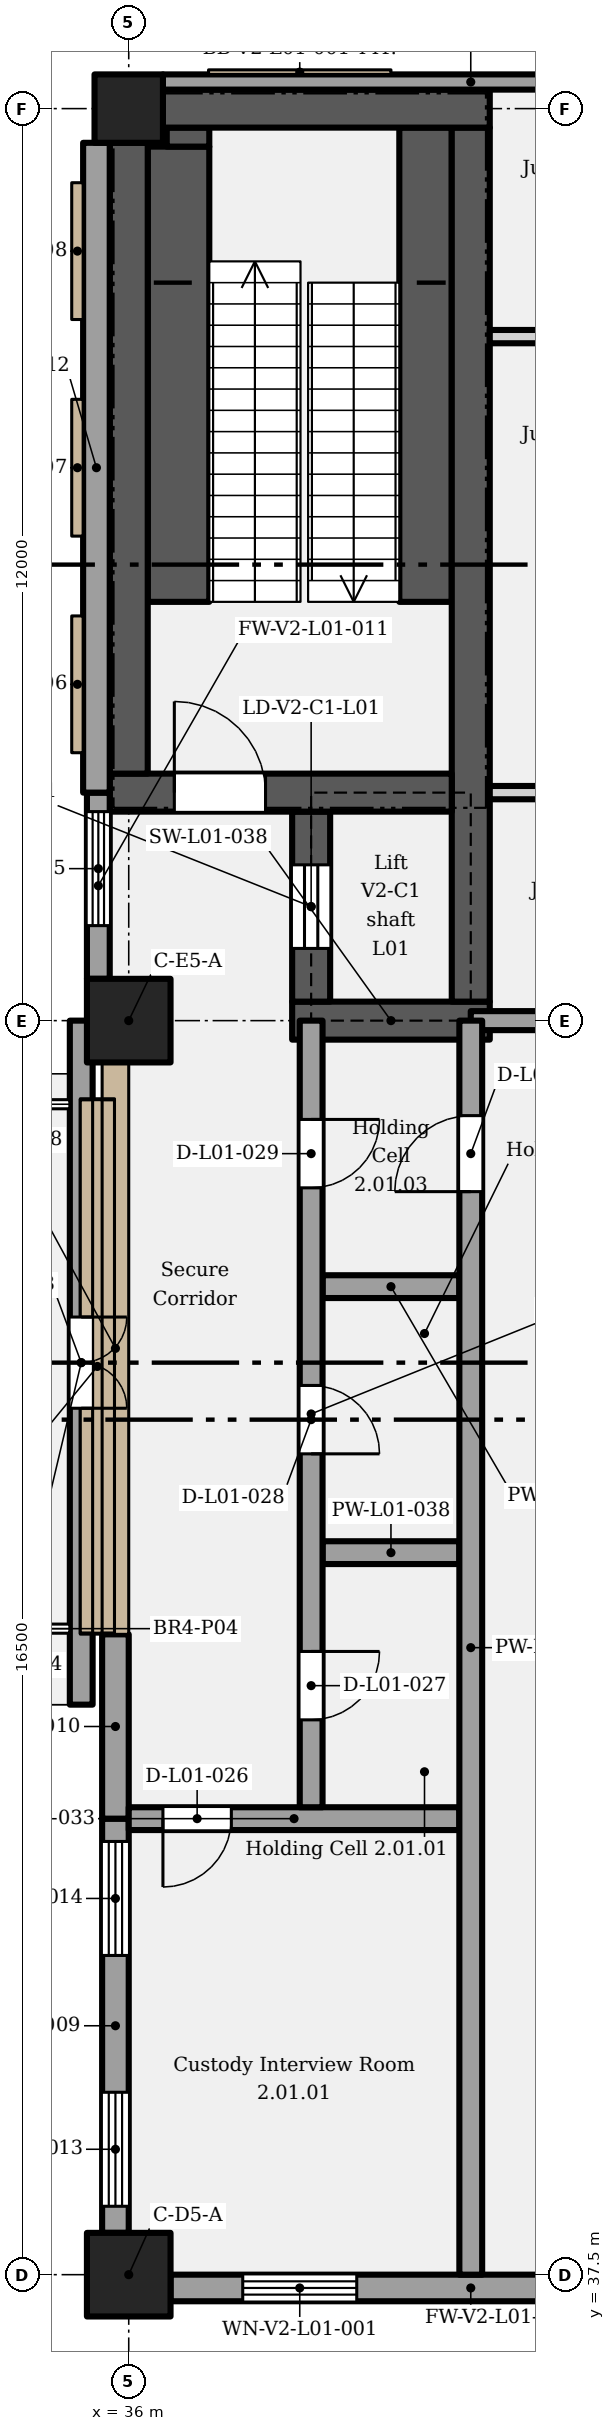
"""IFC4 building model, lengths in metres.
Left out: names, types, materials, properties, quantities, classifications, styles, units other than length and angle.
Written with IfcOpenShell. Run it as: python <this file> out.ifc"""

import sys

from ifc_helpers import new_model, si_unit, direction, frame, frame_2d, origin, origin_2d, place, context, subcontext, project, spatial, rectangle, extrude, element, fill, save


model = new_model("IFC4")
c1 = context("Model", 3, precision=1e-05, world=origin(), true_north=direction((0.0, 1.0)))
c2 = subcontext(c1, "Body", "Model", "MODEL_VIEW")
j1 = project(units=[si_unit("LENGTHUNIT", "METRE"), si_unit("PLANEANGLEUNIT", "RADIAN")], contexts=[c1])
p1 = place(None, origin())
s1 = spatial("IfcSite", under=j1, at=p1, CompositionType="ELEMENT")
p2 = place(p1, origin())
s2 = spatial("IfcBuilding", under=s1, at=p2, CompositionType="ELEMENT")
p3 = place(p2, frame((0.0, 0.0, 6.6)))
s3 = spatial("IfcBuildingStorey", under=s2, at=p3, CompositionType="ELEMENT", Elevation=6.6)
for number, where, z_axis, x_axis in (
    (1, (36.0, 37.5, 0.0), (0.0, 0.0, 1.0), (1.0, 0.0, 0.0)),
    (2, (36.0, 54.0, 0.0), (0.0, 0.0, 1.0), (1.0, 0.0, 0.0)),
):
    element("IfcColumn", number, at=place(p3, frame(where, z_axis=z_axis, x_axis=x_axis)), inside=s3, PredefinedType="COLUMN", context=c2, shape_type="SweptSolid", body=[
        extrude(rectangle(XDim=1.1, YDim=1.1, at=origin_2d()), origin(), (0.0, 0.0, 1.0), 5.4),
    ])
p4 = place(p3, frame((36.0, 66.0, 0.0), z_axis=(0.0, 0.0, 1.0), x_axis=(1.0, 0.0, 0.0)))
e3 = element("IfcColumn", 3, at=p4, inside=s3, PredefinedType="COLUMN", context=c2, shape_type="SweptSolid", body=[
    extrude(rectangle(XDim=0.9, YDim=0.9, at=origin_2d()), origin(), (0.0, 0.0, 1.0), 5.4),
])
p5 = place(p3, frame((38.15, 54.0, 0.0), z_axis=(0.0, 0.0, 1.0), x_axis=(1.0, 0.0, 0.0)))
e4 = element("IfcWall", 4, at=p5, inside=s3, PredefinedType="SHEAR", context=c2, shape_type="SweptSolid", body=[
    extrude(rectangle(XDim=2.6, YDim=0.5, at=frame_2d((1.3, 0.0))), origin(), (0.0, 0.0, 1.0), 5.1),
])
p6 = place(p3, frame((38.4, 54.25, 0.0), z_axis=(0.0, 0.0, 1.0), x_axis=(0.0, 1.0, 0.0)))
e5 = element("IfcWall", 5, at=p6, inside=s3, PredefinedType="SHEAR", context=c2, shape_type="SweptSolid", body=[
    extrude(rectangle(XDim=2.5, YDim=0.5, at=frame_2d((1.25, 0.0))), origin(), (0.0, 0.0, 1.0), 5.1),
])
p7 = place(p6, frame((0.7, 0.0, 0.0)))
e6 = element("IfcOpeningElement", 6, at=p7, cuts=e5, PredefinedType="OPENING", context=c2, shape_type="SweptSolid", body=[
    extrude(rectangle(XDim=1.1, YDim=2.1, at=frame_2d((0.55, 1.05))), frame((0.0, 0.26, 0.0), z_axis=(0.0, -1.0, 0.0), x_axis=(1.0, 0.0, 0.0)), (0.0, 0.0, 1.0), 0.52),
])
p8 = place(p3, frame((40.5, 54.25, 0.0), z_axis=(0.0, 0.0, 1.0), x_axis=(0.0, 1.0, 0.0)))
e7 = element("IfcWall", 7, at=p8, inside=s3, PredefinedType="SHEAR", context=c2, shape_type="SweptSolid", body=[
    extrude(rectangle(XDim=11.5, YDim=0.5, at=frame_2d((5.75, 0.0))), origin(), (0.0, 0.0, 1.0), 5.1),
])
p9 = place(p3, frame((35.75, 57.0, 0.0), z_axis=(0.0, 0.0, 1.0), x_axis=(1.0, 0.0, 0.0)))
e8 = element("IfcWall", 8, at=p9, inside=s3, PredefinedType="SHEAR", context=c2, shape_type="SweptSolid", body=[
    extrude(rectangle(XDim=4.5, YDim=0.5, at=frame_2d((2.25, 0.0))), origin(), (0.0, 0.0, 1.0), 5.1),
])
p10 = place(p9, frame((0.85, 0.0, 0.0)))
e9 = element("IfcOpeningElement", 9, at=p10, cuts=e8, PredefinedType="OPENING", context=c2, shape_type="SweptSolid", body=[
    extrude(rectangle(XDim=1.2, YDim=2.1, at=frame_2d((0.6, 1.05))), frame((0.0, 0.26, 0.0), z_axis=(0.0, -1.0, 0.0), x_axis=(1.0, 0.0, 0.0)), (0.0, 0.0, 1.0), 0.52),
])
p11 = place(p3, frame((36.0, 57.25, 0.0), z_axis=(0.0, 0.0, 1.0), x_axis=(0.0, 1.0, 0.0)))
e10 = element("IfcWall", 10, at=p11, inside=s3, PredefinedType="SHEAR", context=c2, shape_type="SweptSolid", body=[
    extrude(rectangle(XDim=8.3, YDim=0.5, at=frame_2d((4.15, 0.0))), origin(), (0.0, 0.0, 1.0), 5.1),
])
p12 = place(p3, frame((36.45, 66.0, 0.0), z_axis=(0.0, 0.0, 1.0), x_axis=(1.0, 0.0, 0.0)))
e11 = element("IfcWall", 11, at=p12, inside=s3, PredefinedType="SHEAR", context=c2, shape_type="SweptSolid", body=[
    extrude(rectangle(XDim=4.3, YDim=0.5, at=frame_2d((2.15, 0.0))), origin(), (0.0, 0.0, 1.0), 5.1),
])
p13 = place(p3, frame((36.55, 37.325, 0.0), z_axis=(0.0, 0.0, 1.0), x_axis=(1.0, 0.0, 0.0)))
e12 = element("IfcWall", 12, at=p13, inside=s3, PredefinedType="SOLIDWALL", context=c2, shape_type="SweptSolid", body=[
    extrude(rectangle(XDim=7.9, YDim=0.35, at=frame_2d((3.95, 0.0))), origin(), (0.0, 0.0, 1.0), 5.4),
])
p14 = place(p13, frame((0.95, 0.0, 1.05)))
e13 = element("IfcOpeningElement", 13, at=p14, cuts=e12, PredefinedType="OPENING", context=c2, shape_type="SweptSolid", body=[
    extrude(rectangle(XDim=1.5, YDim=3.75, at=frame_2d((0.75, 1.875))), frame((0.0, 0.185, 0.0), z_axis=(0.0, -1.0, 0.0), x_axis=(1.0, 0.0, 0.0)), (0.0, 0.0, 1.0), 0.37),
])
p15 = place(p13, frame((5.45, 0.0, 1.05)))
e14 = element("IfcOpeningElement", 14, at=p15, cuts=e12, PredefinedType="OPENING", context=c2, shape_type="SweptSolid", body=[
    extrude(rectangle(XDim=1.5, YDim=3.75, at=frame_2d((0.75, 1.875))), frame((0.0, 0.185, 0.0), z_axis=(0.0, -1.0, 0.0), x_axis=(1.0, 0.0, 0.0)), (0.0, 0.0, 1.0), 0.37),
])
p16 = place(p3, frame((36.45, 66.35, 0.0), z_axis=(0.0, 0.0, 1.0), x_axis=(1.0, 0.0, 0.0)))
e15 = element("IfcWall", 15, at=p16, inside=s3, PredefinedType="SOLIDWALL", context=c2, shape_type="SweptSolid", body=[
    extrude(rectangle(XDim=8.1, YDim=0.2, at=frame_2d((4.05, 0.0))), origin(), (0.0, 0.0, 1.0), 5.1),
])
p17 = place(p16, frame((6.525, 0.0, 1.05)))
e16 = element("IfcOpeningElement", 16, at=p17, cuts=e15, PredefinedType="OPENING", context=c2, shape_type="SweptSolid", body=[
    extrude(rectangle(XDim=1.05, YDim=2.4, at=frame_2d((0.525, 1.2))), frame((0.0, 0.11, 0.0), z_axis=(0.0, -1.0, 0.0), x_axis=(1.0, 0.0, 0.0)), (0.0, 0.0, 1.0), 0.22),
])
p18 = place(p3, frame((35.825, 38.05, 0.0), z_axis=(0.0, 0.0, 1.0), x_axis=(0.0, 1.0, 0.0)))
e17 = element("IfcWall", 17, at=p18, inside=s3, PredefinedType="SOLIDWALL", context=c2, shape_type="SweptSolid", body=[
    extrude(rectangle(XDim=5.45, YDim=0.35, at=frame_2d((2.725, 0.0))), origin(), (0.0, 0.0, 1.0), 5.1),
])
p19 = place(p18, frame((0.35, 0.0, 1.05)))
e18 = element("IfcOpeningElement", 18, at=p19, cuts=e17, PredefinedType="OPENING", context=c2, shape_type="SweptSolid", body=[
    extrude(rectangle(XDim=1.5, YDim=3.45, at=frame_2d((0.75, 1.725))), frame((0.0, 0.185, 0.0), z_axis=(0.0, -1.0, 0.0), x_axis=(1.0, 0.0, 0.0)), (0.0, 0.0, 1.0), 0.37),
])
p20 = place(p18, frame((3.65, 0.0, 1.05)))
e19 = element("IfcOpeningElement", 19, at=p20, cuts=e17, PredefinedType="OPENING", context=c2, shape_type="SweptSolid", body=[
    extrude(rectangle(XDim=1.5, YDim=3.45, at=frame_2d((0.75, 1.725))), frame((0.0, 0.185, 0.0), z_axis=(0.0, -1.0, 0.0), x_axis=(1.0, 0.0, 0.0)), (0.0, 0.0, 1.0), 0.37),
])
p21 = place(p3, frame((35.825, 43.5, 0.0), z_axis=(0.0, 0.0, 1.0), x_axis=(0.0, 1.0, 0.0)))
e20 = element("IfcWall", 20, at=p21, inside=s3, PredefinedType="SOLIDWALL", context=c2, shape_type="SweptSolid", body=[
    extrude(rectangle(XDim=2.425, YDim=0.35, at=frame_2d((1.212, 0.0))), origin(), (0.0, 0.0, 1.0), 5.1),
])
p22 = place(p3, frame((35.6, 54.55, 0.0), z_axis=(0.0, 0.0, 1.0), x_axis=(0.0, 1.0, 0.0)))
e21 = element("IfcWall", 21, at=p22, inside=s3, PredefinedType="SOLIDWALL", context=c2, shape_type="SweptSolid", body=[
    extrude(rectangle(XDim=2.45, YDim=0.3, at=frame_2d((1.225, 0.0))), origin(), (0.0, 0.0, 1.0), 5.1),
])
p23 = place(p22, frame((0.7, 0.0, 1.05)))
e22 = element("IfcOpeningElement", 22, at=p23, cuts=e21, PredefinedType="OPENING", context=c2, shape_type="SweptSolid", body=[
    extrude(rectangle(XDim=1.5, YDim=3.45, at=frame_2d((0.75, 1.725))), frame((0.0, 0.16, 0.0), z_axis=(0.0, -1.0, 0.0), x_axis=(1.0, 0.0, 0.0)), (0.0, 0.0, 1.0), 0.32),
])
p24 = place(p3, frame((35.575, 57.0, 0.0), z_axis=(0.0, 0.0, 1.0), x_axis=(0.0, 1.0, 0.0)))
e23 = element("IfcWall", 23, at=p24, inside=s3, PredefinedType="SOLIDWALL", context=c2, shape_type="SweptSolid", body=[
    extrude(rectangle(XDim=8.55, YDim=0.35, at=frame_2d((4.275, 0.0))), origin(), (0.0, 0.0, 1.0), 5.1),
])
p25 = place(p3, frame((36.0, 43.5, 0.0), z_axis=(0.0, 0.0, 1.0), x_axis=(1.0, 0.0, 0.0)))
e24 = element("IfcWall", 24, at=p25, inside=s3, PredefinedType="PARTITIONING", context=c2, shape_type="SweptSolid", body=[
    extrude(rectangle(XDim=4.35, YDim=0.3, at=frame_2d((2.175, 0.0))), origin(), (0.0, 0.0, 1.0), 5.1),
])
p26 = place(p25, frame((1.35, 0.0, 0.0), z_axis=(0.0, 0.0, 1.0), x_axis=(-1.0, 0.0, 0.0)))
e25 = element("IfcOpeningElement", 25, at=p26, cuts=e24, PredefinedType="OPENING", context=c2, shape_type="SweptSolid", body=[
    extrude(rectangle(XDim=0.9, YDim=2.1, at=frame_2d((0.45, 1.05))), frame((0.0, 0.16, 0.0), z_axis=(0.0, -1.0, 0.0), x_axis=(1.0, 0.0, 0.0)), (0.0, 0.0, 1.0), 0.32),
])
for number, where, z_axis, x_axis in (
    (26, (38.55, 47.0, 0.0), (0.0, 0.0, 1.0), (1.0, 0.0, 0.0)),
    (27, (38.55, 50.5, 0.0), (0.0, 0.0, 1.0), (1.0, 0.0, 0.0)),
):
    element("IfcWall", number, at=place(p3, frame(where, z_axis=z_axis, x_axis=x_axis)), inside=s3, PredefinedType="PARTITIONING", context=c2, shape_type="SweptSolid", body=[
        extrude(rectangle(XDim=1.8, YDim=0.3, at=frame_2d((0.9, 0.0))), origin(), (0.0, 0.0, 1.0), 5.1),
    ])
p27 = place(p3, frame((40.5, 54.0, 0.0), z_axis=(0.0, 0.0, 1.0), x_axis=(1.0, 0.0, 0.0)))
e28 = element("IfcWall", 28, at=p27, inside=s3, PredefinedType="PARTITIONING", context=c2, shape_type="SweptSolid", body=[
    extrude(rectangle(XDim=3.95, YDim=0.25, at=frame_2d((1.975, 0.0))), origin(), (0.0, 0.0, 1.0), 4.35),
])
p28 = place(p27, frame((1.3, 0.0, 0.0)))
e29 = element("IfcOpeningElement", 29, at=p28, cuts=e28, PredefinedType="OPENING", context=c2, shape_type="SweptSolid", body=[
    extrude(rectangle(XDim=1.0, YDim=2.1, at=frame_2d((0.5, 1.05))), frame((0.0, 0.135, 0.0), z_axis=(0.0, -1.0, 0.0), x_axis=(1.0, 0.0, 0.0)), (0.0, 0.0, 1.0), 0.27),
])
p29 = place(p3, frame((40.75, 57.0, 0.0), z_axis=(0.0, 0.0, 1.0), x_axis=(1.0, 0.0, 0.0)))
e30 = element("IfcWall", 30, at=p29, inside=s3, PredefinedType="PARTITIONING", context=c2, shape_type="SweptSolid", body=[
    extrude(rectangle(XDim=3.275, YDim=0.175, at=frame_2d((1.637, 0.0))), origin(), (0.0, 0.0, 1.0), 5.1),
])
p30 = place(p29, frame((2.0, 0.0, 0.0), z_axis=(0.0, 0.0, 1.0), x_axis=(-1.0, 0.0, 0.0)))
e31 = element("IfcOpeningElement", 31, at=p30, cuts=e30, PredefinedType="OPENING", context=c2, shape_type="SweptSolid", body=[
    extrude(rectangle(XDim=0.9, YDim=2.1, at=frame_2d((0.45, 1.05))), frame((0.0, 0.097, 0.0), z_axis=(0.0, -1.0, 0.0), x_axis=(1.0, 0.0, 0.0)), (0.0, 0.0, 1.0), 0.195),
])
p31 = place(p3, frame((40.75, 63.0, 0.0), z_axis=(0.0, 0.0, 1.0), x_axis=(1.0, 0.0, 0.0)))
e32 = element("IfcWall", 32, at=p31, inside=s3, PredefinedType="PARTITIONING", context=c2, shape_type="SweptSolid", body=[
    extrude(rectangle(XDim=3.35, YDim=0.175, at=frame_2d((1.675, 0.0))), origin(), (0.0, 0.0, 1.0), 5.1),
])
p32 = place(p3, frame((35.375, 45.0, 0.0), z_axis=(0.0, 0.0, 1.0), x_axis=(0.0, 1.0, 0.0)))
e33 = element("IfcWall", 33, at=p32, inside=s3, PredefinedType="PARTITIONING", context=c2, shape_type="SweptSolid", body=[
    extrude(rectangle(XDim=9.0, YDim=0.3, at=frame_2d((4.5, 0.0))), origin(), (0.0, 0.0, 1.0), 3.3),
])
p33 = place(p32, frame((5.1, 0.0, 0.0), z_axis=(0.0, 0.0, 1.0), x_axis=(-1.0, 0.0, 0.0)))
e34 = element("IfcOpeningElement", 34, at=p33, cuts=e33, PredefinedType="OPENING", context=c2, shape_type="SweptSolid", body=[
    extrude(rectangle(XDim=1.2, YDim=2.4, at=frame_2d((0.6, 1.2))), frame((0.0, 0.16, 0.0), z_axis=(0.0, -1.0, 0.0), x_axis=(1.0, 0.0, 0.0)), (0.0, 0.0, 1.0), 0.32),
])
p34 = place(p3, frame((38.4, 43.65, 0.0), z_axis=(0.0, 0.0, 1.0), x_axis=(0.0, 1.0, 0.0)))
e35 = element("IfcWall", 35, at=p34, inside=s3, PredefinedType="PARTITIONING", context=c2, shape_type="SweptSolid", body=[
    extrude(rectangle(XDim=10.35, YDim=0.3, at=frame_2d((5.175, 0.0))), origin(), (0.0, 0.0, 1.0), 5.1),
])
p35 = place(p34, frame((2.05, 0.0, 0.0), z_axis=(0.0, 0.0, 1.0), x_axis=(-1.0, 0.0, 0.0)))
e36 = element("IfcOpeningElement", 36, at=p35, cuts=e35, PredefinedType="OPENING", context=c2, shape_type="SweptSolid", body=[
    extrude(rectangle(XDim=0.9, YDim=2.0, at=frame_2d((0.45, 1.0))), frame((0.0, 0.16, 0.0), z_axis=(0.0, -1.0, 0.0), x_axis=(1.0, 0.0, 0.0)), (0.0, 0.0, 1.0), 0.32),
])
p36 = place(p34, frame((5.55, 0.0, 0.0), z_axis=(0.0, 0.0, 1.0), x_axis=(-1.0, 0.0, 0.0)))
e37 = element("IfcOpeningElement", 37, at=p36, cuts=e35, PredefinedType="OPENING", context=c2, shape_type="SweptSolid", body=[
    extrude(rectangle(XDim=0.9, YDim=2.0, at=frame_2d((0.45, 1.0))), frame((0.0, 0.16, 0.0), z_axis=(0.0, -1.0, 0.0), x_axis=(1.0, 0.0, 0.0)), (0.0, 0.0, 1.0), 0.32),
])
p37 = place(p34, frame((9.05, 0.0, 0.0), z_axis=(0.0, 0.0, 1.0), x_axis=(-1.0, 0.0, 0.0)))
e38 = element("IfcOpeningElement", 38, at=p37, cuts=e35, PredefinedType="OPENING", context=c2, shape_type="SweptSolid", body=[
    extrude(rectangle(XDim=0.9, YDim=2.0, at=frame_2d((0.45, 1.0))), frame((0.0, 0.16, 0.0), z_axis=(0.0, -1.0, 0.0), x_axis=(1.0, 0.0, 0.0)), (0.0, 0.0, 1.0), 0.32),
])
p38 = place(p3, frame((40.5, 37.5, 0.0), z_axis=(0.0, 0.0, 1.0), x_axis=(0.0, 1.0, 0.0)))
e39 = element("IfcWall", 39, at=p38, inside=s3, PredefinedType="PARTITIONING", context=c2, shape_type="SweptSolid", body=[
    extrude(rectangle(XDim=16.5, YDim=0.3, at=frame_2d((8.25, 0.0))), origin(), (0.0, 0.0, 1.0), 3.95),
])
p39 = place(p38, frame((14.25, 0.0, 0.0)))
e40 = element("IfcOpeningElement", 40, at=p39, cuts=e39, PredefinedType="OPENING", context=c2, shape_type="SweptSolid", body=[
    extrude(rectangle(XDim=1.0, YDim=2.0, at=frame_2d((0.5, 1.0))), frame((0.0, 0.16, 0.0), z_axis=(0.0, -1.0, 0.0), x_axis=(1.0, 0.0, 0.0)), (0.0, 0.0, 1.0), 0.32),
])
p40 = place(p3, frame((36.655, 59.51, 0.0), z_axis=(0.0, 0.0, 1.0), x_axis=(0.0, 1.0, 0.0)))
e41 = element("IfcWall", 41, at=p40, inside=s3, PredefinedType="SHEAR", context=c2, shape_type="SweptSolid", body=[
    extrude(rectangle(XDim=5.99, YDim=0.81, at=frame_2d((2.995, 0.0))), origin(), (0.0, 0.0, 1.0), 2.587),
])
p41 = place(p3, frame((36.78, 65.5, 0.0), z_axis=(0.0, 0.0, 1.0), x_axis=(0.0, 1.0, 0.0)))
e42 = element("IfcWall", 42, at=p41, inside=s3, PredefinedType="SHEAR", context=c2, shape_type="SweptSolid", body=[
    extrude(rectangle(XDim=0.25, YDim=0.56, at=frame_2d((0.125, 0.0))), origin(), (0.0, 0.0, 1.0), 2.587),
])
p42 = place(p3, frame((39.905, 59.51, 0.0), z_axis=(0.0, 0.0, 1.0), x_axis=(0.0, 1.0, 0.0)))
e43 = element("IfcWall", 43, at=p42, inside=s3, PredefinedType="SHEAR", context=c2, shape_type="SweptSolid", body=[
    extrude(rectangle(XDim=6.24, YDim=0.69, at=frame_2d((3.12, 0.0))), origin(), (0.0, 0.0, 1.0), 2.587),
])
p43 = place(p14, origin())
e44 = element("IfcWindow", 44, at=p43, inside=s3, PartitioningType="SINGLE_PANEL", PredefinedType="WINDOW", context=c2, shape_type="SweptSolid", body=[
    extrude(rectangle(XDim=1.5, YDim=3.75, at=frame_2d((0.75, 1.875))), frame((0.0, 0.03, 0.0), z_axis=(0.0, -1.0, 0.0), x_axis=(1.0, 0.0, 0.0)), (0.0, 0.0, 1.0), 0.06),
])
fill(e13, e44)
p44 = place(p19, origin())
e45 = element("IfcWindow", 45, at=p44, inside=s3, PartitioningType="SINGLE_PANEL", PredefinedType="WINDOW", context=c2, shape_type="SweptSolid", body=[
    extrude(rectangle(XDim=1.5, YDim=3.45, at=frame_2d((0.75, 1.725))), frame((0.0, 0.03, 0.0), z_axis=(0.0, -1.0, 0.0), x_axis=(1.0, 0.0, 0.0)), (0.0, 0.0, 1.0), 0.06),
])
fill(e18, e45)
p45 = place(p20, origin())
e46 = element("IfcWindow", 46, at=p45, inside=s3, PartitioningType="SINGLE_PANEL", PredefinedType="WINDOW", context=c2, shape_type="SweptSolid", body=[
    extrude(rectangle(XDim=1.5, YDim=3.45, at=frame_2d((0.75, 1.725))), frame((0.0, 0.03, 0.0), z_axis=(0.0, -1.0, 0.0), x_axis=(1.0, 0.0, 0.0)), (0.0, 0.0, 1.0), 0.06),
])
fill(e19, e46)
p46 = place(p23, origin())
e47 = element("IfcWindow", 47, at=p46, inside=s3, PartitioningType="SINGLE_PANEL", PredefinedType="WINDOW", context=c2, shape_type="SweptSolid", body=[
    extrude(rectangle(XDim=1.5, YDim=3.45, at=frame_2d((0.75, 1.725))), frame((0.0, 0.03, 0.0), z_axis=(0.0, -1.0, 0.0), x_axis=(1.0, 0.0, 0.0)), (0.0, 0.0, 1.0), 0.06),
])
fill(e22, e47)
p47 = place(p33, origin())
e48 = element("IfcDoor", 48, at=p47, inside=s3, OperationType="DOUBLE_DOOR_SINGLE_SWING", PredefinedType="DOOR", context=c2, shape_type="SweptSolid", body=[
    extrude(rectangle(XDim=1.2, YDim=2.4, at=frame_2d((0.6, 1.2))), frame((0.0, 0.025, 0.0), z_axis=(0.0, -1.0, 0.0), x_axis=(1.0, 0.0, 0.0)), (0.0, 0.0, 1.0), 0.05),
])
fill(e34, e48)
p48 = place(p7, origin())
e49 = element("IfcDoor", 49, at=p48, inside=s3, OperationType="SLIDING_TO_LEFT", PredefinedType="DOOR", context=c2, shape_type="SweptSolid", body=[
    extrude(rectangle(XDim=1.1, YDim=2.1, at=frame_2d((0.55, 1.05))), frame((0.0, 0.025, 0.0), z_axis=(0.0, -1.0, 0.0), x_axis=(1.0, 0.0, 0.0)), (0.0, 0.0, 1.0), 0.05),
])
fill(e6, e49)
p49 = place(p10, origin())
e50 = element("IfcDoor", 50, at=p49, inside=s3, OperationType="SINGLE_SWING_LEFT", PredefinedType="DOOR", context=c2, shape_type="SweptSolid", body=[
    extrude(rectangle(XDim=1.2, YDim=2.1, at=frame_2d((0.6, 1.05))), frame((0.0, 0.025, 0.0), z_axis=(0.0, -1.0, 0.0), x_axis=(1.0, 0.0, 0.0)), (0.0, 0.0, 1.0), 0.05),
])
fill(e9, e50)
p50 = place(p26, origin())
e51 = element("IfcDoor", 51, at=p50, inside=s3, OperationType="SINGLE_SWING_RIGHT", PredefinedType="DOOR", context=c2, shape_type="SweptSolid", body=[
    extrude(rectangle(XDim=0.9, YDim=2.1, at=frame_2d((0.45, 1.05))), frame((0.0, 0.025, 0.0), z_axis=(0.0, -1.0, 0.0), x_axis=(1.0, 0.0, 0.0)), (0.0, 0.0, 1.0), 0.05),
])
fill(e25, e51)
p51 = place(p35, origin())
e52 = element("IfcDoor", 52, at=p51, inside=s3, OperationType="SINGLE_SWING_LEFT", PredefinedType="DOOR", context=c2, shape_type="SweptSolid", body=[
    extrude(rectangle(XDim=0.9, YDim=2.0, at=frame_2d((0.45, 1.0))), frame((0.0, 0.025, 0.0), z_axis=(0.0, -1.0, 0.0), x_axis=(1.0, 0.0, 0.0)), (0.0, 0.0, 1.0), 0.05),
])
fill(e36, e52)
p52 = place(p36, origin())
e53 = element("IfcDoor", 53, at=p52, inside=s3, OperationType="SINGLE_SWING_RIGHT", PredefinedType="DOOR", context=c2, shape_type="SweptSolid", body=[
    extrude(rectangle(XDim=0.9, YDim=2.0, at=frame_2d((0.45, 1.0))), frame((0.0, 0.025, 0.0), z_axis=(0.0, -1.0, 0.0), x_axis=(1.0, 0.0, 0.0)), (0.0, 0.0, 1.0), 0.05),
])
fill(e37, e53)
p53 = place(p37, origin())
e54 = element("IfcDoor", 54, at=p53, inside=s3, OperationType="SINGLE_SWING_LEFT", PredefinedType="DOOR", context=c2, shape_type="SweptSolid", body=[
    extrude(rectangle(XDim=0.9, YDim=2.0, at=frame_2d((0.45, 1.0))), frame((0.0, 0.025, 0.0), z_axis=(0.0, -1.0, 0.0), x_axis=(1.0, 0.0, 0.0)), (0.0, 0.0, 1.0), 0.05),
])
fill(e38, e54)
p54 = place(p39, origin())
e55 = element("IfcDoor", 55, at=p54, inside=s3, OperationType="SINGLE_SWING_LEFT", PredefinedType="DOOR", context=c2, shape_type="SweptSolid", body=[
    extrude(rectangle(XDim=1.0, YDim=2.0, at=frame_2d((0.5, 1.0))), frame((0.0, 0.025, 0.0), z_axis=(0.0, -1.0, 0.0), x_axis=(1.0, 0.0, 0.0)), (0.0, 0.0, 1.0), 0.05),
])
fill(e40, e55)
save(model, sys.argv[1])
